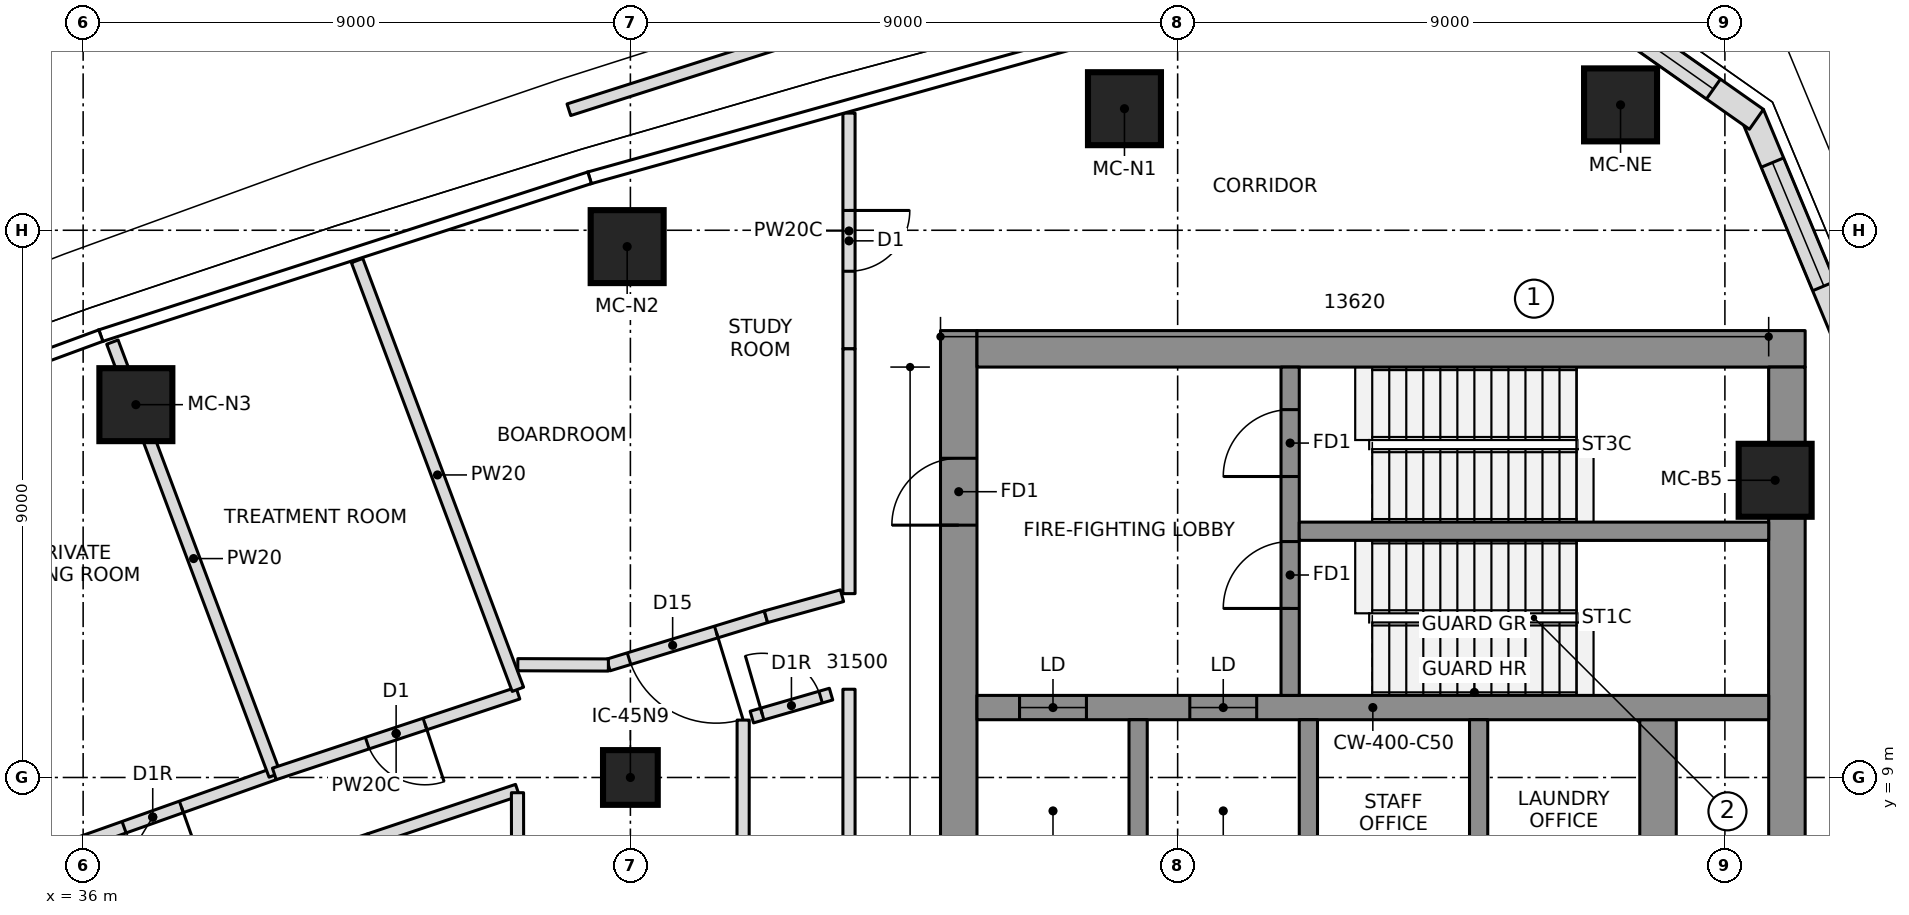
"""IFC4 building model, lengths in metres.
Left out: names, types, materials, properties, quantities, classifications, styles, units other than length and angle.
Written with IfcOpenShell. Run it as: python <this file> out.ifc"""

import sys

from ifc_helpers import new_model, si_unit, direction, frame, frame_2d, origin, origin_2d, place, context, subcontext, project, spatial, polyline, rectangle, outline, extrude, element, fill, save


model = new_model("IFC4")
c1 = context("Model", 3, precision=1e-05, world=origin(), true_north=direction((0.0, 1.0)))
c2 = subcontext(c1, "Body", "Model", "MODEL_VIEW")
j1 = project(units=[si_unit("LENGTHUNIT", "METRE"), si_unit("PLANEANGLEUNIT", "RADIAN")], contexts=[c1])
p1 = place(None, origin())
s1 = spatial("IfcSite", under=j1, at=p1, CompositionType="ELEMENT")
p2 = place(p1, origin())
s2 = spatial("IfcBuilding", under=s1, at=p2, CompositionType="ELEMENT")
p3 = place(p2, frame((0.0, 0.0, 216.2)))
s3 = spatial("IfcBuildingStorey", under=s2, at=p3, CompositionType="ELEMENT", Elevation=216.2)
p4 = place(p3, frame((50.4, 6.65, 0.0), z_axis=(0.0, 0.0, 1.0), x_axis=(0.0, 1.0, 0.0)))
e1 = element("IfcWall", 1, at=p4, inside=s3, PredefinedType="SHEAR", context=c2, shape_type="SweptSolid", body=[
    extrude(rectangle(XDim=9.7, YDim=0.6, at=frame_2d((4.85, 0.0))), origin(), (0.0, 0.0, 1.0), 4.6),
])
p5 = place(p4, frame((6.5, 0.0, 0.0)))
e2 = element("IfcOpeningElement", 2, at=p5, cuts=e1, PredefinedType="OPENING", context=c2, shape_type="SweptSolid", body=[
    extrude(rectangle(XDim=1.1, YDim=2.1, at=frame_2d((0.55, 1.05))), frame((0.0, 0.31, 0.0), z_axis=(0.0, -1.0, 0.0), x_axis=(1.0, 0.0, 0.0)), (0.0, 0.0, 1.0), 0.62),
])
p6 = place(p3, frame((50.7, 16.05, 0.0), z_axis=(0.0, 0.0, 1.0), x_axis=(1.0, 0.0, 0.0)))
e3 = element("IfcWall", 3, at=p6, inside=s3, PredefinedType="SHEAR", context=c2, shape_type="SweptSolid", body=[
    extrude(rectangle(XDim=13.62, YDim=0.6, at=frame_2d((6.81, 0.0))), origin(), (0.0, 0.0, 1.0), 4.6),
])
p7 = place(p3, frame((64.02, 7.502, 0.0), z_axis=(0.0, 0.0, 1.0), x_axis=(0.0, 1.0, 0.0)))
e4 = element("IfcWall", 4, at=p7, inside=s3, PredefinedType="SHEAR", context=c2, shape_type="SweptSolid", body=[
    extrude(rectangle(XDim=8.248, YDim=0.6, at=frame_2d((4.124, 0.0))), origin(), (0.0, 0.0, 1.0), 4.6),
])
p8 = place(p3, frame((61.9, -9.95, 0.0), z_axis=(0.0, 0.0, 1.0), x_axis=(0.0, 1.0, 0.0)))
e5 = element("IfcWall", 5, at=p8, inside=s3, PredefinedType="SHEAR", context=c2, shape_type="SweptSolid", body=[
    extrude(rectangle(XDim=19.9, YDim=0.6, at=frame_2d((9.95, 0.0))), origin(), (0.0, 0.0, 1.0), 4.6),
])
p9 = place(p3, frame((50.7, 10.15, 0.0), z_axis=(0.0, 0.0, 1.0), x_axis=(1.0, 0.0, 0.0)))
e6 = element("IfcWall", 6, at=p9, inside=s3, PredefinedType="SHEAR", context=c2, shape_type="SweptSolid", body=[
    extrude(rectangle(XDim=13.02, YDim=0.4, at=frame_2d((6.51, 0.0))), origin(), (0.0, 0.0, 1.0), 4.6),
])
p10 = place(p9, frame((0.7, 0.0, 0.0)))
e7 = element("IfcOpeningElement", 7, at=p10, cuts=e6, PredefinedType="OPENING", context=c2, shape_type="SweptSolid", body=[
    extrude(rectangle(XDim=1.1, YDim=2.1, at=frame_2d((0.55, 1.05))), frame((0.0, 0.21, 0.0), z_axis=(0.0, -1.0, 0.0), x_axis=(1.0, 0.0, 0.0)), (0.0, 0.0, 1.0), 0.42),
])
p11 = place(p9, frame((3.5, 0.0, 0.0)))
e8 = element("IfcOpeningElement", 8, at=p11, cuts=e6, PredefinedType="OPENING", context=c2, shape_type="SweptSolid", body=[
    extrude(rectangle(XDim=1.1, YDim=2.1, at=frame_2d((0.55, 1.05))), frame((0.0, 0.21, 0.0), z_axis=(0.0, -1.0, 0.0), x_axis=(1.0, 0.0, 0.0)), (0.0, 0.0, 1.0), 0.42),
])
for number, where, z_axis, x_axis in (
    (9, (53.35, 6.95, 0.0), (0.0, 0.0, 1.0), (0.0, 1.0, 0.0)),
    (10, (56.15, 6.95, 0.0), (0.0, 0.0, 1.0), (0.0, 1.0, 0.0)),
    (11, (58.95, 6.95, 0.0), (0.0, 0.0, 1.0), (0.0, 1.0, 0.0)),
):
    element("IfcWall", number, at=place(p3, frame(where, z_axis=z_axis, x_axis=x_axis)), inside=s3, PredefinedType="SHEAR", context=c2, shape_type="SweptSolid", body=[
        extrude(rectangle(XDim=3.0, YDim=0.3, at=frame_2d((1.5, 0.0))), origin(), (0.0, 0.0, 1.0), 4.6),
    ])
p12 = place(p3, frame((55.85, 10.35, 0.0), z_axis=(0.0, 0.0, 1.0), x_axis=(0.0, 1.0, 0.0)))
e12 = element("IfcWall", 12, at=p12, inside=s3, PredefinedType="SHEAR", context=c2, shape_type="SweptSolid", body=[
    extrude(rectangle(XDim=5.4, YDim=0.3, at=frame_2d((2.7, 0.0))), origin(), (0.0, 0.0, 1.0), 4.6),
])
p13 = place(p12, frame((1.43, 0.0, 0.0)))
e13 = element("IfcOpeningElement", 13, at=p13, cuts=e12, PredefinedType="OPENING", context=c2, shape_type="SweptSolid", body=[
    extrude(rectangle(XDim=1.1, YDim=2.1, at=frame_2d((0.55, 1.05))), frame((0.0, 0.16, 0.0), z_axis=(0.0, -1.0, 0.0), x_axis=(1.0, 0.0, 0.0)), (0.0, 0.0, 1.0), 0.32),
])
p14 = place(p12, frame((3.6, 0.0, 0.0)))
e14 = element("IfcOpeningElement", 14, at=p14, cuts=e12, PredefinedType="OPENING", context=c2, shape_type="SweptSolid", body=[
    extrude(rectangle(XDim=1.1, YDim=2.1, at=frame_2d((0.55, 1.05))), frame((0.0, 0.16, 0.0), z_axis=(0.0, -1.0, 0.0), x_axis=(1.0, 0.0, 0.0)), (0.0, 0.0, 1.0), 0.32),
])
p15 = place(p3, frame((56.0, 13.05, 0.0), z_axis=(0.0, 0.0, 1.0), x_axis=(1.0, 0.0, 0.0)))
e15 = element("IfcWall", 15, at=p15, inside=s3, PredefinedType="SHEAR", context=c2, shape_type="SweptSolid", body=[
    extrude(rectangle(XDim=7.72, YDim=0.3, at=frame_2d((3.86, 0.0))), origin(), (0.0, 0.0, 1.0), 4.6),
])
for number, where, z_axis, x_axis in (
    (16, (63.826, 13.888, 0.0), (0.0, 0.0, 1.0), (1.0, 0.0, 0.0)),
    (17, (61.284, 20.062, 0.0), (0.0, 0.0, 1.0), (1.0, 0.0, 0.0)),
    (18, (53.125, 20.0, 0.0), (0.0, 0.0, 1.0), (1.0, 0.0, 0.0)),
    (19, (44.947, 17.731, 0.0), (0.0, 0.0, 1.0), (1.0, 0.0, 0.0)),
    (20, (36.867, 15.132, 0.0), (0.0, 0.0, 1.0), (1.0, 0.0, 0.0)),
):
    element("IfcColumn", number, at=place(p3, frame(where, z_axis=z_axis, x_axis=x_axis)), inside=s3, PredefinedType="COLUMN", context=c2, shape_type="SweptSolid", body=[
        extrude(rectangle(XDim=1.2, YDim=1.2, at=origin_2d()), origin(), (0.0, 0.0, 1.0), 4.6),
    ])
p16 = place(p3, frame((45.0, 9.0, 0.0), z_axis=(0.0, 0.0, 1.0), x_axis=(1.0, 0.0, 0.0)))
e21 = element("IfcColumn", 21, at=p16, inside=s3, PredefinedType="COLUMN", context=c2, shape_type="SweptSolid", body=[
    extrude(rectangle(XDim=0.9, YDim=0.9, at=origin_2d()), origin(), (0.0, 0.0, 1.0), 4.6),
])
p17 = place(p3, frame((64.938, 16.337, 0.0), z_axis=(0.0, 0.0, 1.0), x_axis=(-0.3844335483, 0.923152667191, 0.0)))
e22 = element("IfcWall", 22, at=p17, inside=s3, PredefinedType="NOTDEFINED", context=c2, shape_type="SweptSolid", body=[
    extrude(outline(polyline([(-0.03, -0.2), (3.871, -0.2), (3.756, 0.2), (0.03, 0.2), (-0.03, -0.2)])), origin(), (0.0, 0.0, 1.0), 4.3),
])
p18 = place(p17, frame((0.807, 0.0, 0.6)))
e23 = element("IfcOpeningElement", 23, at=p18, cuts=e22, PredefinedType="OPENING", context=c2, shape_type="SweptSolid", body=[
    extrude(outline(polyline([(0.0, 1.35), (0.084, 1.771), (0.322, 2.128), (0.679, 2.366), (1.1, 2.45), (1.521, 2.366), (1.878, 2.128), (2.116, 1.771), (2.2, 1.35), (2.2, 1.1), (2.116, 0.679), (1.878, 0.322), (1.521, 0.084), (1.1, 0.0), (0.679, 0.084), (0.322, 0.322), (0.084, 0.679), (0.0, 1.1), (0.0, 1.35)])), frame((0.0, 0.21, 0.0), z_axis=(0.0, -1.0, 0.0), x_axis=(1.0, 0.0, 0.0)), (0.0, 0.0, 1.0), 0.42),
])
p19 = place(p3, frame((63.471, 19.858, 0.0), z_axis=(0.0, 0.0, 1.0), x_axis=(-0.817942545532, 0.575299915009, 0.0)))
e24 = element("IfcWall", 24, at=p19, inside=s3, PredefinedType="NOTDEFINED", context=c2, shape_type="SweptSolid", body=[
    extrude(outline(polyline([(-0.058, -0.2), (3.871, -0.2), (3.756, 0.2), (0.058, 0.2), (-0.058, -0.2)])), origin(), (0.0, 0.0, 1.0), 4.3),
])
p20 = place(p19, frame((0.807, 0.0, 0.6)))
e25 = element("IfcOpeningElement", 25, at=p20, cuts=e24, PredefinedType="OPENING", context=c2, shape_type="SweptSolid", body=[
    extrude(outline(polyline([(0.0, 1.35), (0.084, 1.771), (0.322, 2.128), (0.679, 2.366), (1.1, 2.45), (1.521, 2.366), (1.878, 2.128), (2.116, 1.771), (2.2, 1.35), (2.2, 1.1), (2.116, 0.679), (1.878, 0.322), (1.521, 0.084), (1.1, 0.0), (0.679, 0.084), (0.322, 0.322), (0.084, 0.679), (0.0, 1.1), (0.0, 1.35)])), frame((0.0, 0.21, 0.0), z_axis=(0.0, -1.0, 0.0), x_axis=(1.0, 0.0, 0.0)), (0.0, 0.0, 1.0), 0.42),
])
p21 = place(p3, frame((48.088, 21.289, 0.0), z_axis=(0.0, 0.0, 1.0), x_axis=(-0.952727369543, -0.303826528341, 0.0)))
e26 = element("IfcWall", 26, at=p21, inside=s3, PredefinedType="PARAPET", context=c2, shape_type="SweptSolid", body=[
    extrude(rectangle(XDim=4.303, YDim=0.2, at=frame_2d((2.151, 0.0))), origin(), (0.0, 0.0, 1.0), 1.1),
])
p22 = place(p3, frame((39.145, 9.059, 0.0), z_axis=(0.0, 0.0, 1.0), x_axis=(-0.942440025415, -0.334375236068, 0.0)))
e27 = element("IfcWall", 27, at=p22, inside=s3, PredefinedType="PARTITIONING", context=c2, shape_type="SweptSolid", body=[
    extrude(rectangle(XDim=4.244, YDim=0.2, at=frame_2d((2.122, 0.0))), origin(), (0.0, 0.0, 1.0), 4.3),
])
p23 = place(p22, frame((1.622, 0.0, 0.0)))
e28 = element("IfcOpeningElement", 28, at=p23, cuts=e27, PredefinedType="OPENING", context=c2, shape_type="SweptSolid", body=[
    extrude(rectangle(XDim=1.0, YDim=2.1, at=frame_2d((0.5, 1.05))), frame((0.0, 0.11, 0.0), z_axis=(0.0, -1.0, 0.0), x_axis=(1.0, 0.0, 0.0)), (0.0, 0.0, 1.0), 0.22),
])
p24 = place(p3, frame((39.152, 9.04, 0.0), z_axis=(0.0, 0.0, 1.0), x_axis=(-0.351133995718, 0.936325219703, 0.0)))
e29 = element("IfcWall", 29, at=p24, inside=s3, PredefinedType="PARTITIONING", context=c2, shape_type="SweptSolid", body=[
    extrude(rectangle(XDim=7.605, YDim=0.2, at=frame_2d((3.803, 0.0))), origin(), (0.0, 0.0, 1.0), 4.3),
])
p25 = place(p3, frame((43.15, 10.386, 0.0), z_axis=(0.0, 0.0, 1.0), x_axis=(-0.949231523576, -0.314578312427, 0.0)))
e30 = element("IfcWall", 30, at=p25, inside=s3, PredefinedType="PARTITIONING", context=c2, shape_type="SweptSolid", body=[
    extrude(rectangle(XDim=4.219, YDim=0.2, at=frame_2d((2.11, 0.0))), origin(), (0.0, 0.0, 1.0), 4.3),
])
p26 = place(p25, frame((1.61, 0.0, 0.0)))
e31 = element("IfcOpeningElement", 31, at=p26, cuts=e30, PredefinedType="OPENING", context=c2, shape_type="SweptSolid", body=[
    extrude(rectangle(XDim=1.0, YDim=2.1, at=frame_2d((0.5, 1.05))), frame((0.0, 0.11, 0.0), z_axis=(0.0, -1.0, 0.0), x_axis=(1.0, 0.0, 0.0)), (0.0, 0.0, 1.0), 0.22),
])
p27 = place(p3, frame((43.15, 10.45, 0.0), z_axis=(0.0, 0.0, 1.0), x_axis=(-0.351119888923, 0.936330509811, 0.0)))
e32 = element("IfcWall", 32, at=p27, inside=s3, PredefinedType="PARTITIONING", context=c2, shape_type="SweptSolid", body=[
    extrude(rectangle(XDim=7.531, YDim=0.2, at=frame_2d((3.766, 0.0))), origin(), (0.0, 0.0, 1.0), 4.3),
])
p28 = place(p3, frame((47.23, 11.643, 0.0), z_axis=(0.0, 0.0, 1.0), x_axis=(-0.956220019134, -0.292648722887, 0.0)))
e33 = element("IfcWall", 33, at=p28, inside=s3, PredefinedType="PARTITIONING", context=c2, shape_type="SweptSolid", body=[
    extrude(rectangle(XDim=2.71, YDim=0.2, at=frame_2d((1.355, 0.0))), origin(), (0.0, 0.0, 1.0), 4.3),
])
p29 = place(p28, frame((0.855, 0.0, 0.0)))
e34 = element("IfcOpeningElement", 34, at=p29, cuts=e33, PredefinedType="OPENING", context=c2, shape_type="SweptSolid", body=[
    extrude(rectangle(XDim=1.5, YDim=2.1, at=frame_2d((0.75, 1.05))), frame((0.0, 0.11, 0.0), z_axis=(0.0, -1.0, 0.0), x_axis=(1.0, 0.0, 0.0)), (0.0, 0.0, 1.0), 0.22),
])
p30 = place(p3, frame((39.314, 7.512, 0.0), z_axis=(0.0, 0.0, 1.0), x_axis=(0.94846740352, 0.316874714137, 0.0)))
e35 = element("IfcWall", 35, at=p30, inside=s3, PredefinedType="PARTITIONING", context=c2, shape_type="SweptSolid", body=[
    extrude(rectangle(XDim=1.472, YDim=0.2, at=frame_2d((0.736, 0.0))), origin(), (0.0, 0.0, 1.0), 4.3),
])
p31 = place(p3, frame((40.709, 7.979, 0.0), z_axis=(0.0, 0.0, 1.0), x_axis=(0.948473756095, 0.316855699016, 0.0)))
e36 = element("IfcWall", 36, at=p31, inside=s3, PredefinedType="PARTITIONING", context=c2, shape_type="SweptSolid", body=[
    extrude(rectangle(XDim=2.566, YDim=0.2, at=frame_2d((1.283, 0.0))), origin(), (0.0, 0.0, 1.0), 4.3),
])
p32 = place(p3, frame((46.997, 9.993, 0.0), z_axis=(0.0, 0.0, 1.0), x_axis=(0.960450321583, 0.278451395706, 0.0)))
e37 = element("IfcWall", 37, at=p32, inside=s3, PredefinedType="PARTITIONING", context=c2, shape_type="SweptSolid", body=[
    extrude(rectangle(XDim=1.356, YDim=0.2, at=frame_2d((0.678, 0.0))), origin(), (0.0, 0.0, 1.0), 4.3),
])
p33 = place(p32, frame((0.178, 0.0, 0.0)))
e38 = element("IfcOpeningElement", 38, at=p33, cuts=e37, PredefinedType="OPENING", context=c2, shape_type="SweptSolid", body=[
    extrude(rectangle(XDim=1.0, YDim=2.1, at=frame_2d((0.5, 1.05))), frame((0.0, 0.11, 0.0), z_axis=(0.0, -1.0, 0.0), x_axis=(1.0, 0.0, 0.0)), (0.0, 0.0, 1.0), 0.22),
])
p34 = place(p3, frame((48.595, 19.927, 0.0), z_axis=(0.0, 0.0, 1.0), x_axis=(0.0, -1.0, 0.0)))
e39 = element("IfcWall", 39, at=p34, inside=s3, PredefinedType="PARTITIONING", context=c2, shape_type="SweptSolid", body=[
    extrude(rectangle(XDim=3.877, YDim=0.2, at=frame_2d((1.938, 0.0))), origin(), (0.0, 0.0, 1.0), 4.3),
])
p35 = place(p34, frame((1.601, 0.0, 0.0)))
e40 = element("IfcOpeningElement", 40, at=p35, cuts=e39, PredefinedType="OPENING", context=c2, shape_type="SweptSolid", body=[
    extrude(rectangle(XDim=1.0, YDim=2.1, at=frame_2d((0.5, 1.05))), frame((0.0, 0.11, 0.0), z_axis=(0.0, -1.0, 0.0), x_axis=(1.0, 0.0, 0.0)), (0.0, 0.0, 1.0), 0.22),
])
p36 = place(p3, frame((43.143, 8.75, 0.0), z_axis=(0.0, 0.0, 1.0), x_axis=(0.001524156132, -0.999998838473, 0.0)))
e41 = element("IfcWall", 41, at=p36, inside=s3, PredefinedType="PARTITIONING", context=c2, shape_type="SweptSolid", body=[
    extrude(rectangle(XDim=1.602, YDim=0.2, at=frame_2d((0.801, 0.0))), origin(), (0.0, 0.0, 1.0), 4.3),
])
p37 = place(p3, frame((46.853, 7.186, 0.0), z_axis=(0.0, 0.0, 1.0), x_axis=(0.00079667143, 0.999999682657, 0.0)))
e42 = element("IfcWall", 42, at=p37, inside=s3, PredefinedType="PARTITIONING", context=c2, shape_type="SweptSolid", body=[
    extrude(rectangle(XDim=2.758, YDim=0.2, at=frame_2d((1.379, 0.0))), origin(), (0.0, 0.0, 1.0), 4.3),
])
p38 = place(p3, frame((48.595, 10.451, 0.0), z_axis=(0.0, 0.0, 1.0), x_axis=(0.0, -1.0, 0.0)))
e43 = element("IfcWall", 43, at=p38, inside=s3, PredefinedType="PARTITIONING", context=c2, shape_type="SweptSolid", body=[
    extrude(rectangle(XDim=20.903, YDim=0.2, at=frame_2d((10.451, 0.0))), origin(), (0.0, 0.0, 1.0), 4.3),
])
p39 = place(p3, frame((44.638, 10.85, 0.0), z_axis=(0.0, 0.0, 1.0), x_axis=(-0.999995150779, 0.003114228465, 0.0)))
e44 = element("IfcWall", 44, at=p39, inside=s3, PredefinedType="PARTITIONING", context=c2, shape_type="SweptSolid", body=[
    extrude(rectangle(XDim=1.49, YDim=0.2, at=frame_2d((0.745, 0.0))), origin(), (0.0, 0.0, 1.0), 4.3),
])
p40 = place(p3, frame((48.595, 16.05, 0.0), z_axis=(0.0, 0.0, 1.0), x_axis=(0.0, -1.0, 0.0)))
e45 = element("IfcWall", 45, at=p40, inside=s3, PredefinedType="PARTITIONING", context=c2, shape_type="SweptSolid", body=[
    extrude(rectangle(XDim=4.026, YDim=0.2, at=frame_2d((2.013, 0.0))), origin(), (0.0, 0.0, 1.0), 4.3),
])
p41 = place(p3, frame((48.48, 11.99, 0.0), z_axis=(0.0, 0.0, 1.0), x_axis=(-0.963687566022, -0.267032348406, 0.0)))
e46 = element("IfcWall", 46, at=p41, inside=s3, PredefinedType="PARTITIONING", context=c2, shape_type="SweptSolid", body=[
    extrude(rectangle(XDim=1.297, YDim=0.2, at=frame_2d((0.649, 0.0))), origin(), (0.0, 0.0, 1.0), 4.3),
])
p42 = place(p18, origin())
e47 = element("IfcWindow", 47, at=p42, inside=s3, PartitioningType="SINGLE_PANEL", PredefinedType="WINDOW", context=c2, shape_type="SweptSolid", body=[
    extrude(outline(polyline([(0.0, 1.35), (0.084, 1.771), (0.322, 2.128), (0.679, 2.366), (1.1, 2.45), (1.521, 2.366), (1.878, 2.128), (2.116, 1.771), (2.2, 1.35), (2.2, 1.1), (2.116, 0.679), (1.878, 0.322), (1.521, 0.084), (1.1, 0.0), (0.679, 0.084), (0.322, 0.322), (0.084, 0.679), (0.0, 1.1), (0.0, 1.35)])), frame((0.0, 0.17, 0.0), z_axis=(0.0, -1.0, 0.0), x_axis=(1.0, 0.0, 0.0)), (0.0, 0.0, 1.0), 0.06),
])
fill(e23, e47)
p43 = place(p20, origin())
e48 = element("IfcWindow", 48, at=p43, inside=s3, PartitioningType="SINGLE_PANEL", PredefinedType="WINDOW", context=c2, shape_type="SweptSolid", body=[
    extrude(outline(polyline([(0.0, 1.35), (0.084, 1.771), (0.322, 2.128), (0.679, 2.366), (1.1, 2.45), (1.521, 2.366), (1.878, 2.128), (2.116, 1.771), (2.2, 1.35), (2.2, 1.1), (2.116, 0.679), (1.878, 0.322), (1.521, 0.084), (1.1, 0.0), (0.679, 0.084), (0.322, 0.322), (0.084, 0.679), (0.0, 1.1), (0.0, 1.35)])), frame((0.0, 0.17, 0.0), z_axis=(0.0, -1.0, 0.0), x_axis=(1.0, 0.0, 0.0)), (0.0, 0.0, 1.0), 0.06),
])
fill(e25, e48)
p44 = place(p23, origin())
e49 = element("IfcDoor", 49, at=p44, inside=s3, OperationType="SINGLE_SWING_RIGHT", PredefinedType="DOOR", context=c2, shape_type="SweptSolid", body=[
    extrude(rectangle(XDim=1.0, YDim=2.1, at=frame_2d((0.5, 1.05))), frame((0.0, 0.025, 0.0), z_axis=(0.0, -1.0, 0.0), x_axis=(1.0, 0.0, 0.0)), (0.0, 0.0, 1.0), 0.05),
])
fill(e28, e49)
p45 = place(p26, origin())
e50 = element("IfcDoor", 50, at=p45, inside=s3, OperationType="SINGLE_SWING_LEFT", PredefinedType="DOOR", context=c2, shape_type="SweptSolid", body=[
    extrude(rectangle(XDim=1.0, YDim=2.1, at=frame_2d((0.5, 1.05))), frame((0.0, 0.025, 0.0), z_axis=(0.0, -1.0, 0.0), x_axis=(1.0, 0.0, 0.0)), (0.0, 0.0, 1.0), 0.05),
])
fill(e31, e50)
p46 = place(p29, origin())
e51 = element("IfcDoor", 51, at=p46, inside=s3, OperationType="DOUBLE_DOOR_SINGLE_SWING", PredefinedType="DOOR", context=c2, shape_type="SweptSolid", body=[
    extrude(rectangle(XDim=1.5, YDim=2.1, at=frame_2d((0.75, 1.05))), frame((0.0, 0.025, 0.0), z_axis=(0.0, -1.0, 0.0), x_axis=(1.0, 0.0, 0.0)), (0.0, 0.0, 1.0), 0.05),
])
fill(e34, e51)
p47 = place(p33, origin())
e52 = element("IfcDoor", 52, at=p47, inside=s3, OperationType="SINGLE_SWING_RIGHT", PredefinedType="DOOR", context=c2, shape_type="SweptSolid", body=[
    extrude(rectangle(XDim=1.0, YDim=2.1, at=frame_2d((0.5, 1.05))), frame((0.0, 0.025, 0.0), z_axis=(0.0, -1.0, 0.0), x_axis=(1.0, 0.0, 0.0)), (0.0, 0.0, 1.0), 0.05),
])
fill(e38, e52)
p48 = place(p35, origin())
e53 = element("IfcDoor", 53, at=p48, inside=s3, OperationType="SINGLE_SWING_LEFT", PredefinedType="DOOR", context=c2, shape_type="SweptSolid", body=[
    extrude(rectangle(XDim=1.0, YDim=2.1, at=frame_2d((0.5, 1.05))), frame((0.0, 0.025, 0.0), z_axis=(0.0, -1.0, 0.0), x_axis=(1.0, 0.0, 0.0)), (0.0, 0.0, 1.0), 0.05),
])
fill(e40, e53)
p49 = place(p10, origin())
e54 = element("IfcDoor", 54, at=p49, inside=s3, OperationType="DOUBLE_DOOR_SLIDING", PredefinedType="DOOR", context=c2, shape_type="SweptSolid", body=[
    extrude(rectangle(XDim=1.1, YDim=2.1, at=frame_2d((0.55, 1.05))), frame((0.0, 0.025, 0.0), z_axis=(0.0, -1.0, 0.0), x_axis=(1.0, 0.0, 0.0)), (0.0, 0.0, 1.0), 0.05),
])
fill(e7, e54)
p50 = place(p11, origin())
e55 = element("IfcDoor", 55, at=p50, inside=s3, OperationType="DOUBLE_DOOR_SLIDING", PredefinedType="DOOR", context=c2, shape_type="SweptSolid", body=[
    extrude(rectangle(XDim=1.1, YDim=2.1, at=frame_2d((0.55, 1.05))), frame((0.0, 0.025, 0.0), z_axis=(0.0, -1.0, 0.0), x_axis=(1.0, 0.0, 0.0)), (0.0, 0.0, 1.0), 0.05),
])
fill(e8, e55)
p51 = place(p13, origin())
e56 = element("IfcDoor", 56, at=p51, inside=s3, OperationType="SINGLE_SWING_RIGHT", PredefinedType="DOOR", context=c2, shape_type="SweptSolid", body=[
    extrude(rectangle(XDim=1.1, YDim=2.1, at=frame_2d((0.55, 1.05))), frame((0.0, 0.025, 0.0), z_axis=(0.0, -1.0, 0.0), x_axis=(1.0, 0.0, 0.0)), (0.0, 0.0, 1.0), 0.05),
])
fill(e13, e56)
p52 = place(p14, origin())
e57 = element("IfcDoor", 57, at=p52, inside=s3, OperationType="SINGLE_SWING_RIGHT", PredefinedType="DOOR", context=c2, shape_type="SweptSolid", body=[
    extrude(rectangle(XDim=1.1, YDim=2.1, at=frame_2d((0.55, 1.05))), frame((0.0, 0.025, 0.0), z_axis=(0.0, -1.0, 0.0), x_axis=(1.0, 0.0, 0.0)), (0.0, 0.0, 1.0), 0.05),
])
fill(e14, e57)
p53 = place(p5, origin())
e58 = element("IfcDoor", 58, at=p53, inside=s3, OperationType="SINGLE_SWING_RIGHT", PredefinedType="DOOR", context=c2, shape_type="SweptSolid", body=[
    extrude(rectangle(XDim=1.1, YDim=2.1, at=frame_2d((0.55, 1.05))), frame((0.0, 0.025, 0.0), z_axis=(0.0, -1.0, 0.0), x_axis=(1.0, 0.0, 0.0)), (0.0, 0.0, 1.0), 0.05),
])
fill(e2, e58)
save(model, sys.argv[1])
